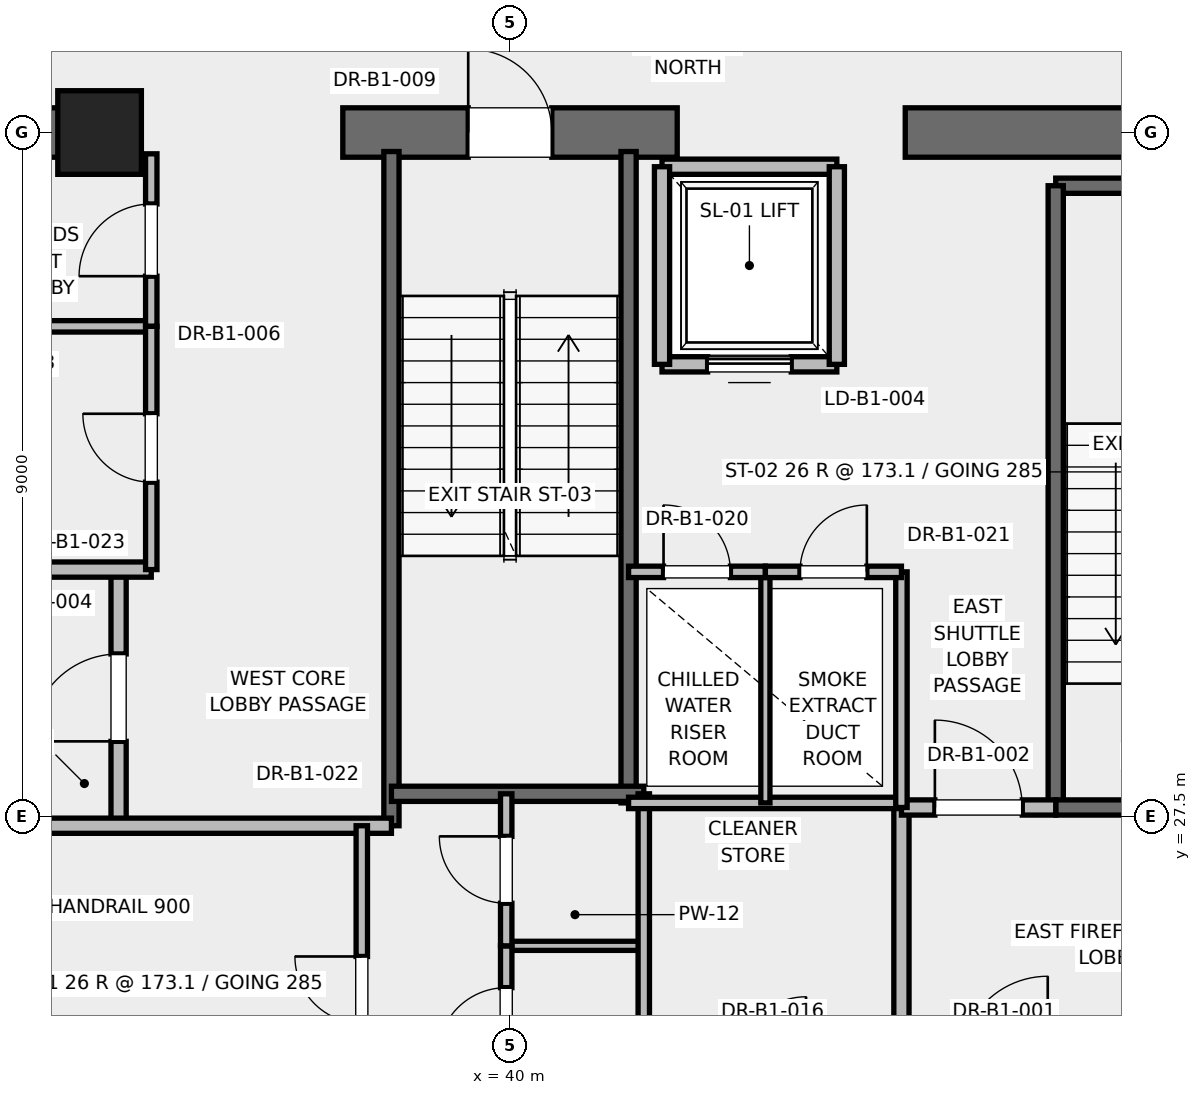
"""IFC4 building model, lengths in metres.
Left out: names, types, materials, properties, quantities, classifications, styles, units other than length and angle.
Written with IfcOpenShell. Run it as: python <this file> out.ifc"""

import sys

from ifc_helpers import new_model, si_unit, direction, frame, frame_2d, origin, origin_2d, place, context, subcontext, project, spatial, rectangle, extrude, element, fill, save


model = new_model("IFC4")
c1 = context("Model", 3, precision=1e-05, world=origin(), true_north=direction((0.0, 1.0)))
c2 = subcontext(c1, "Body", "Model", "MODEL_VIEW")
j1 = project(units=[si_unit("LENGTHUNIT", "METRE"), si_unit("PLANEANGLEUNIT", "RADIAN")], contexts=[c1])
p1 = place(None, origin())
s1 = spatial("IfcSite", under=j1, at=p1, CompositionType="ELEMENT")
p2 = place(p1, origin())
s2 = spatial("IfcBuilding", under=s1, at=p2, CompositionType="ELEMENT")
p3 = place(p2, frame((0.0, 0.0, -4.5)))
s3 = spatial("IfcBuildingStorey", under=s2, at=p3, CompositionType="ELEMENT", Elevation=-4.5)
p4 = place(p3, frame((34.6, 36.5, 0.0), z_axis=(0.0, 0.0, 1.0), x_axis=(1.0, 0.0, 0.0)))
e1 = element("IfcColumn", 1, at=p4, inside=s3, PredefinedType="PILASTER", context=c2, shape_type="SweptSolid", body=[
    extrude(rectangle(XDim=1.1, YDim=1.1, at=origin_2d()), origin(), (0.0, 0.0, 1.0), 4.5),
])
p5 = place(p3, frame((29.0, 36.5, 0.0), z_axis=(0.0, 0.0, 1.0), x_axis=(1.0, 0.0, 0.0)))
e2 = element("IfcWall", 2, at=p5, inside=s3, PredefinedType="SHEAR", context=c2, shape_type="SweptSolid", body=[
    extrude(rectangle(XDim=5.8, YDim=0.65, at=frame_2d((2.9, 0.0))), origin(), (0.0, 0.0, 1.0), 4.22),
])
p6 = place(p3, frame((37.8, 36.5, 0.0), z_axis=(0.0, 0.0, 1.0), x_axis=(1.0, 0.0, 0.0)))
e3 = element("IfcWall", 3, at=p6, inside=s3, PredefinedType="SHEAR", context=c2, shape_type="SweptSolid", body=[
    extrude(rectangle(XDim=4.4, YDim=0.65, at=frame_2d((2.2, 0.0))), origin(), (0.0, 0.0, 1.0), 4.22),
])
p7 = place(p6, frame((1.65, 0.0, 0.0)))
e4 = element("IfcOpeningElement", 4, at=p7, cuts=e3, PredefinedType="OPENING", context=c2, shape_type="SweptSolid", body=[
    extrude(rectangle(XDim=1.1, YDim=2.15, at=frame_2d((0.55, 1.075))), frame((0.0, 0.325, 0.0), z_axis=(0.0, -1.0, 0.0), x_axis=(1.0, 0.0, 0.0)), (0.0, 0.0, 1.0), 0.65),
])
p8 = place(p3, frame((45.2, 36.5, 0.0), z_axis=(0.0, 0.0, 1.0), x_axis=(1.0, 0.0, 0.0)))
e5 = element("IfcWall", 5, at=p8, inside=s3, PredefinedType="SHEAR", context=c2, shape_type="SweptSolid", body=[
    extrude(rectangle(XDim=5.8, YDim=0.65, at=frame_2d((2.9, 0.0))), origin(), (0.0, 0.0, 1.0), 4.22),
])
p9 = place(p3, frame((47.18, 35.8, 0.0), z_axis=(0.0, 0.0, 1.0), x_axis=(1.0, 0.0, 0.0)))
e6 = element("IfcWall", 6, at=p9, inside=s3, PredefinedType="SOLIDWALL", context=c2, shape_type="SweptSolid", body=[
    extrude(rectangle(XDim=3.12, YDim=0.2, at=frame_2d((1.56, 0.0))), origin(), (0.0, 0.0, 1.0), 4.22),
])
p10 = place(p3, frame((47.18, 27.62, 0.0), z_axis=(0.0, 0.0, 1.0), x_axis=(0.0, 1.0, 0.0)))
e7 = element("IfcWall", 7, at=p10, inside=s3, PredefinedType="SOLIDWALL", context=c2, shape_type="SweptSolid", body=[
    extrude(rectangle(XDim=8.18, YDim=0.2, at=frame_2d((4.09, 0.0))), origin(), (0.0, 0.0, 1.0), 4.22),
])
p11 = place(p3, frame((47.18, 27.62, 0.0), z_axis=(0.0, 0.0, 1.0), x_axis=(1.0, 0.0, 0.0)))
e8 = element("IfcWall", 8, at=p11, inside=s3, PredefinedType="SOLIDWALL", context=c2, shape_type="SweptSolid", body=[
    extrude(rectangle(XDim=3.12, YDim=0.2, at=frame_2d((1.56, 0.0))), origin(), (0.0, 0.0, 1.0), 4.22),
])
p12 = place(p11, frame((1.01, 0.0, 0.0)))
e9 = element("IfcOpeningElement", 9, at=p12, cuts=e8, PredefinedType="OPENING", context=c2, shape_type="SweptSolid", body=[
    extrude(rectangle(XDim=1.1, YDim=2.15, at=frame_2d((0.55, 1.075))), frame((0.0, 0.1, 0.0), z_axis=(0.0, -1.0, 0.0), x_axis=(1.0, 0.0, 0.0)), (0.0, 0.0, 1.0), 0.2),
])
p13 = place(p3, frame((38.44, 27.38, 0.0), z_axis=(0.0, 0.0, 1.0), x_axis=(0.0, 1.0, 0.0)))
e10 = element("IfcWall", 10, at=p13, inside=s3, PredefinedType="SOLIDWALL", context=c2, shape_type="SweptSolid", body=[
    extrude(rectangle(XDim=8.87, YDim=0.2, at=frame_2d((4.435, 0.0))), origin(), (0.0, 0.0, 1.0), 4.22),
])
p14 = place(p3, frame((41.56, 27.68, 0.0), z_axis=(0.0, 0.0, 1.0), x_axis=(0.0, 1.0, 0.0)))
e11 = element("IfcWall", 11, at=p14, inside=s3, PredefinedType="SOLIDWALL", context=c2, shape_type="SweptSolid", body=[
    extrude(rectangle(XDim=8.57, YDim=0.2, at=frame_2d((4.285, 0.0))), origin(), (0.0, 0.0, 1.0), 4.22),
])
p15 = place(p3, frame((38.44, 27.8, 0.0), z_axis=(0.0, 0.0, 1.0), x_axis=(1.0, 0.0, 0.0)))
e12 = element("IfcWall", 12, at=p15, inside=s3, PredefinedType="SOLIDWALL", context=c2, shape_type="SweptSolid", body=[
    extrude(rectangle(XDim=3.32, YDim=0.2, at=frame_2d((1.66, 0.0))), origin(), (0.0, 0.0, 1.0), 4.22),
])
p16 = place(p3, frame((34.85, 27.38, 0.0), z_axis=(0.0, 0.0, 1.0), x_axis=(0.0, 1.0, 0.0)))
e13 = element("IfcWall", 13, at=p16, inside=s3, PredefinedType="PARTITIONING", context=c2, shape_type="SweptSolid", body=[
    extrude(rectangle(XDim=3.37, YDim=0.2, at=frame_2d((1.685, 0.0))), origin(), (0.0, 0.0, 1.0), 4.22),
])
p17 = place(p16, frame((1.11, 0.0, 0.0)))
e14 = element("IfcOpeningElement", 14, at=p17, cuts=e13, PredefinedType="OPENING", context=c2, shape_type="SweptSolid", body=[
    extrude(rectangle(XDim=1.15, YDim=2.2, at=frame_2d((0.575, 1.1))), frame((0.0, 0.1, 0.0), z_axis=(0.0, -1.0, 0.0), x_axis=(1.0, 0.0, 0.0)), (0.0, 0.0, 1.0), 0.2),
])
p18 = place(p3, frame((32.82, 27.38, 0.0), z_axis=(0.0, 0.0, 1.0), x_axis=(1.0, 0.0, 0.0)))
e15 = element("IfcWall", 15, at=p18, inside=s3, PredefinedType="PARTITIONING", context=c2, shape_type="SweptSolid", body=[
    extrude(rectangle(XDim=5.62, YDim=0.2, at=frame_2d((2.81, 0.0))), origin(), (0.0, 0.0, 1.0), 4.22),
])
p19 = place(p3, frame((32.15, 30.75, 0.0), z_axis=(0.0, 0.0, 1.0), x_axis=(1.0, 0.0, 0.0)))
e16 = element("IfcWall", 16, at=p19, inside=s3, PredefinedType="PARTITIONING", context=c2, shape_type="SweptSolid", body=[
    extrude(rectangle(XDim=3.13, YDim=0.2, at=frame_2d((1.565, 0.0))), origin(), (0.0, 0.0, 1.0), 4.22),
])
p20 = place(p3, frame((45.15, 24.25, 0.0), z_axis=(0.0, 0.0, 1.0), x_axis=(0.0, 1.0, 0.0)))
e17 = element("IfcWall", 17, at=p20, inside=s3, PredefinedType="PARTITIONING", context=c2, shape_type="SweptSolid", body=[
    extrude(rectangle(XDim=3.37, YDim=0.2, at=frame_2d((1.685, 0.0))), origin(), (0.0, 0.0, 1.0), 4.22),
])
p21 = place(p3, frame((45.15, 27.62, 0.0), z_axis=(0.0, 0.0, 1.0), x_axis=(1.0, 0.0, 0.0)))
e18 = element("IfcWall", 18, at=p21, inside=s3, PredefinedType="PARTITIONING", context=c2, shape_type="SweptSolid", body=[
    extrude(rectangle(XDim=2.03, YDim=0.2, at=frame_2d((1.015, 0.0))), origin(), (0.0, 0.0, 1.0), 4.22),
])
p22 = place(p21, frame((0.44, 0.0, 0.0)))
e19 = element("IfcOpeningElement", 19, at=p22, cuts=e18, PredefinedType="OPENING", context=c2, shape_type="SweptSolid", body=[
    extrude(rectangle(XDim=1.15, YDim=2.2, at=frame_2d((0.575, 1.1))), frame((0.0, 0.1, 0.0), z_axis=(0.0, -1.0, 0.0), x_axis=(1.0, 0.0, 0.0)), (0.0, 0.0, 1.0), 0.2),
])
p23 = place(p3, frame((42.0, 33.45, 0.0), z_axis=(0.0, 0.0, 1.0), x_axis=(1.0, 0.0, 0.0)))
e20 = element("IfcWall", 20, at=p23, inside=s3, PredefinedType="SOLIDWALL", context=c2, shape_type="SweptSolid", body=[
    extrude(rectangle(XDim=2.3, YDim=0.2, at=frame_2d((1.15, 0.0))), origin(), (0.0, 0.0, 1.0), 4.22),
])
p24 = place(p23, frame((0.6, 0.0, 0.0)))
e21 = element("IfcOpeningElement", 21, at=p24, cuts=e20, PredefinedType="OPENING", context=c2, shape_type="SweptSolid", body=[
    extrude(rectangle(XDim=1.1, YDim=2.2, at=frame_2d((0.55, 1.1))), frame((0.0, 0.1, 0.0), z_axis=(0.0, -1.0, 0.0), x_axis=(1.0, 0.0, 0.0)), (0.0, 0.0, 1.0), 0.2),
])
p25 = place(p3, frame((44.3, 36.05, 0.0), z_axis=(0.0, 0.0, 1.0), x_axis=(-1.0, 0.0, 0.0)))
e22 = element("IfcWall", 22, at=p25, inside=s3, PredefinedType="SOLIDWALL", context=c2, shape_type="SweptSolid", body=[
    extrude(rectangle(XDim=2.3, YDim=0.2, at=frame_2d((1.15, 0.0))), origin(), (0.0, 0.0, 1.0), 3.0),
])
for number, where, z_axis, x_axis in (
    (23, (42.0, 36.05, 0.0), (0.0, 0.0, 1.0), (0.0, -1.0, 0.0)),
    (24, (44.3, 33.45, 0.0), (0.0, 0.0, 1.0), (0.0, 1.0, 0.0)),
):
    element("IfcWall", number, at=place(p3, frame(where, z_axis=z_axis, x_axis=x_axis)), inside=s3, PredefinedType="SOLIDWALL", context=c2, shape_type="SweptSolid", body=[
        extrude(rectangle(XDim=2.6, YDim=0.2, at=frame_2d((1.3, 0.0))), origin(), (0.0, 0.0, 1.0), 3.0),
    ])
p26 = place(p3, frame((39.95, 25.8, 0.0), z_axis=(0.0, 0.0, 1.0), x_axis=(1.0, 0.0, 0.0)))
e25 = element("IfcWall", 25, at=p26, inside=s3, PredefinedType="PARTITIONING", context=c2, shape_type="SweptSolid", body=[
    extrude(rectangle(XDim=1.81, YDim=0.12, at=frame_2d((0.905, 0.0))), origin(), (0.0, 0.0, 1.0), 2.85),
])
p27 = place(p3, frame((41.76, 23.8, 0.0), z_axis=(0.0, 0.0, 1.0), x_axis=(0.0, 1.0, 0.0)))
e26 = element("IfcWall", 26, at=p27, inside=s3, PredefinedType="PARTITIONING", context=c2, shape_type="SweptSolid", body=[
    extrude(rectangle(XDim=4.0, YDim=0.15, at=frame_2d((2.0, 0.0))), origin(), (0.0, 0.0, 1.0), 2.85),
])
p28 = place(p3, frame((39.95, 23.8, 0.0), z_axis=(0.0, 0.0, 1.0), x_axis=(0.0, 1.0, 0.0)))
e27 = element("IfcWall", 27, at=p28, inside=s3, PredefinedType="PARTITIONING", context=c2, shape_type="SweptSolid", body=[
    extrude(rectangle(XDim=2.0, YDim=0.15, at=frame_2d((1.0, 0.0))), origin(), (0.0, 0.0, 1.0), 2.85),
])
p29 = place(p28, frame((0.55, 0.0, 0.0)))
e28 = element("IfcOpeningElement", 28, at=p29, cuts=e27, PredefinedType="OPENING", context=c2, shape_type="SweptSolid", body=[
    extrude(rectangle(XDim=0.9, YDim=2.1, at=frame_2d((0.45, 1.05))), frame((0.0, 0.075, 0.0), z_axis=(0.0, -1.0, 0.0), x_axis=(1.0, 0.0, 0.0)), (0.0, 0.0, 1.0), 0.15),
])
p30 = place(p3, frame((39.95, 25.8, 0.0), z_axis=(0.0, 0.0, 1.0), x_axis=(0.0, 1.0, 0.0)))
e29 = element("IfcWall", 29, at=p30, inside=s3, PredefinedType="PARTITIONING", context=c2, shape_type="SweptSolid", body=[
    extrude(rectangle(XDim=2.0, YDim=0.15, at=frame_2d((1.0, 0.0))), origin(), (0.0, 0.0, 1.0), 2.85),
])
p31 = place(p30, frame((0.56, 0.0, 0.0)))
e30 = element("IfcOpeningElement", 30, at=p31, cuts=e29, PredefinedType="OPENING", context=c2, shape_type="SweptSolid", body=[
    extrude(rectangle(XDim=0.88, YDim=2.1, at=frame_2d((0.44, 1.05))), frame((0.0, 0.075, 0.0), z_axis=(0.0, -1.0, 0.0), x_axis=(1.0, 0.0, 0.0)), (0.0, 0.0, 1.0), 0.15),
])
p32 = place(p3, frame((32.15, 33.95, 0.0), z_axis=(0.0, 0.0, 1.0), x_axis=(1.0, 0.0, 0.0)))
e31 = element("IfcWall", 31, at=p32, inside=s3, PredefinedType="PARTITIONING", context=c2, shape_type="SweptSolid", body=[
    extrude(rectangle(XDim=3.13, YDim=0.15, at=frame_2d((1.565, 0.0))), origin(), (0.0, 0.0, 1.0), 2.85),
])
p33 = place(p3, frame((35.28, 33.95, 0.0), z_axis=(0.0, 0.0, 1.0), x_axis=(0.0, 1.0, 0.0)))
e32 = element("IfcWall", 32, at=p33, inside=s3, PredefinedType="PARTITIONING", context=c2, shape_type="SweptSolid", body=[
    extrude(rectangle(XDim=2.27, YDim=0.15, at=frame_2d((1.135, 0.0))), origin(), (0.0, 0.0, 1.0), 2.85),
])
p34 = place(p33, frame((0.66, 0.0, 0.0)))
e33 = element("IfcOpeningElement", 33, at=p34, cuts=e32, PredefinedType="OPENING", context=c2, shape_type="SweptSolid", body=[
    extrude(rectangle(XDim=0.95, YDim=2.15, at=frame_2d((0.475, 1.075))), frame((0.0, 0.075, 0.0), z_axis=(0.0, -1.0, 0.0), x_axis=(1.0, 0.0, 0.0)), (0.0, 0.0, 1.0), 0.15),
])
p35 = place(p3, frame((35.28, 30.75, 0.0), z_axis=(0.0, 0.0, 1.0), x_axis=(0.0, 1.0, 0.0)))
e34 = element("IfcWall", 34, at=p35, inside=s3, PredefinedType="PARTITIONING", context=c2, shape_type="SweptSolid", body=[
    extrude(rectangle(XDim=3.2, YDim=0.15, at=frame_2d((1.6, 0.0))), origin(), (0.0, 0.0, 1.0), 2.85),
])
p36 = place(p35, frame((1.15, 0.0, 0.0)))
e35 = element("IfcOpeningElement", 35, at=p36, cuts=e34, PredefinedType="OPENING", context=c2, shape_type="SweptSolid", body=[
    extrude(rectangle(XDim=0.9, YDim=2.1, at=frame_2d((0.45, 1.05))), frame((0.0, 0.075, 0.0), z_axis=(0.0, -1.0, 0.0), x_axis=(1.0, 0.0, 0.0)), (0.0, 0.0, 1.0), 0.15),
])
p37 = place(p3, frame((38.05, 23.06, 0.0), z_axis=(0.0, 0.0, 1.0), x_axis=(0.0, 1.0, 0.0)))
e36 = element("IfcWall", 36, at=p37, inside=s3, PredefinedType="PARTITIONING", context=c2, shape_type="SweptSolid", body=[
    extrude(rectangle(XDim=4.32, YDim=0.15, at=frame_2d((2.16, 0.0))), origin(), (0.0, 0.0, 1.0), 2.85),
])
p38 = place(p37, frame((1.72, 0.0, 0.0)))
e37 = element("IfcOpeningElement", 37, at=p38, cuts=e36, PredefinedType="OPENING", context=c2, shape_type="SweptSolid", body=[
    extrude(rectangle(XDim=0.88, YDim=2.1, at=frame_2d((0.44, 1.05))), frame((0.0, 0.075, 0.0), z_axis=(0.0, -1.0, 0.0), x_axis=(1.0, 0.0, 0.0)), (0.0, 0.0, 1.0), 0.15),
])
p39 = place(p3, frame((41.56, 27.68, 0.0), z_axis=(0.0, 0.0, 1.0), x_axis=(1.0, 0.0, 0.0)))
e38 = element("IfcWall", 38, at=p39, inside=s3, PredefinedType="PARTITIONING", context=c2, shape_type="SweptSolid", body=[
    extrude(rectangle(XDim=3.59, YDim=0.15, at=frame_2d((1.795, 0.0))), origin(), (0.0, 0.0, 1.0), 2.85),
])
p40 = place(p3, frame((45.15, 27.62, 0.0), z_axis=(0.0, 0.0, 1.0), x_axis=(0.0, 1.0, 0.0)))
e39 = element("IfcWall", 39, at=p40, inside=s3, PredefinedType="PARTITIONING", context=c2, shape_type="SweptSolid", body=[
    extrude(rectangle(XDim=3.1, YDim=0.15, at=frame_2d((1.55, 0.0))), origin(), (0.0, 0.0, 1.0), 2.85),
])
p41 = place(p3, frame((43.36, 27.68, 0.0), z_axis=(0.0, 0.0, 1.0), x_axis=(0.0, 1.0, 0.0)))
e40 = element("IfcWall", 40, at=p41, inside=s3, PredefinedType="PARTITIONING", context=c2, shape_type="SweptSolid", body=[
    extrude(rectangle(XDim=3.04, YDim=0.12, at=frame_2d((1.52, 0.0))), origin(), (0.0, 0.0, 1.0), 2.85),
])
p42 = place(p3, frame((41.56, 30.72, 0.0), z_axis=(0.0, 0.0, 1.0), x_axis=(1.0, 0.0, 0.0)))
e41 = element("IfcWall", 41, at=p42, inside=s3, PredefinedType="PARTITIONING", context=c2, shape_type="SweptSolid", body=[
    extrude(rectangle(XDim=1.8, YDim=0.15, at=frame_2d((0.9, 0.0))), origin(), (0.0, 0.0, 1.0), 2.85),
])
p43 = place(p42, frame((0.46, 0.0, 0.0)))
e42 = element("IfcOpeningElement", 42, at=p43, cuts=e41, PredefinedType="OPENING", context=c2, shape_type="SweptSolid", body=[
    extrude(rectangle(XDim=0.88, YDim=2.1, at=frame_2d((0.44, 1.05))), frame((0.0, 0.075, 0.0), z_axis=(0.0, -1.0, 0.0), x_axis=(1.0, 0.0, 0.0)), (0.0, 0.0, 1.0), 0.15),
])
p44 = place(p3, frame((43.36, 30.72, 0.0), z_axis=(0.0, 0.0, 1.0), x_axis=(1.0, 0.0, 0.0)))
e43 = element("IfcWall", 43, at=p44, inside=s3, PredefinedType="PARTITIONING", context=c2, shape_type="SweptSolid", body=[
    extrude(rectangle(XDim=1.79, YDim=0.15, at=frame_2d((0.895, 0.0))), origin(), (0.0, 0.0, 1.0), 2.85),
])
p45 = place(p44, frame((0.455, 0.0, 0.0)))
e44 = element("IfcOpeningElement", 44, at=p45, cuts=e43, PredefinedType="OPENING", context=c2, shape_type="SweptSolid", body=[
    extrude(rectangle(XDim=0.88, YDim=2.1, at=frame_2d((0.44, 1.05))), frame((0.0, 0.075, 0.0), z_axis=(0.0, -1.0, 0.0), x_axis=(1.0, 0.0, 0.0)), (0.0, 0.0, 1.0), 0.15),
])
p46 = place(p7, origin())
e45 = element("IfcDoor", 45, at=p46, inside=s3, OperationType="SINGLE_SWING_LEFT", PredefinedType="DOOR", context=c2, shape_type="SweptSolid", body=[
    extrude(rectangle(XDim=1.1, YDim=2.15, at=frame_2d((0.55, 1.075))), frame((0.0, 0.025, 0.0), z_axis=(0.0, -1.0, 0.0), x_axis=(1.0, 0.0, 0.0)), (0.0, 0.0, 1.0), 0.05),
])
fill(e4, e45)
p47 = place(p17, origin())
e46 = element("IfcDoor", 46, at=p47, inside=s3, OperationType="SINGLE_SWING_LEFT", PredefinedType="DOOR", context=c2, shape_type="SweptSolid", body=[
    extrude(rectangle(XDim=1.15, YDim=2.2, at=frame_2d((0.575, 1.1))), frame((0.0, 0.025, 0.0), z_axis=(0.0, -1.0, 0.0), x_axis=(1.0, 0.0, 0.0)), (0.0, 0.0, 1.0), 0.05),
])
fill(e14, e46)
p48 = place(p22, origin())
e47 = element("IfcDoor", 47, at=p48, inside=s3, OperationType="SINGLE_SWING_LEFT", PredefinedType="DOOR", context=c2, shape_type="SweptSolid", body=[
    extrude(rectangle(XDim=1.15, YDim=2.2, at=frame_2d((0.575, 1.1))), frame((0.0, 0.025, 0.0), z_axis=(0.0, -1.0, 0.0), x_axis=(1.0, 0.0, 0.0)), (0.0, 0.0, 1.0), 0.05),
])
fill(e19, e47)
p49 = place(p24, origin())
e48 = element("IfcDoor", 48, at=p49, inside=s3, OperationType="SLIDING_TO_RIGHT", PredefinedType="DOOR", context=c2, shape_type="SweptSolid", body=[
    extrude(rectangle(XDim=1.1, YDim=2.2, at=frame_2d((0.55, 1.1))), frame((0.0, 0.025, 0.0), z_axis=(0.0, -1.0, 0.0), x_axis=(1.0, 0.0, 0.0)), (0.0, 0.0, 1.0), 0.05),
])
fill(e21, e48)
p50 = place(p29, origin())
e49 = element("IfcDoor", 49, at=p50, inside=s3, OperationType="SINGLE_SWING_LEFT", PredefinedType="DOOR", context=c2, shape_type="SweptSolid", body=[
    extrude(rectangle(XDim=0.9, YDim=2.1, at=frame_2d((0.45, 1.05))), frame((0.0, 0.025, 0.0), z_axis=(0.0, -1.0, 0.0), x_axis=(1.0, 0.0, 0.0)), (0.0, 0.0, 1.0), 0.05),
])
fill(e28, e49)
p51 = place(p31, origin())
e50 = element("IfcDoor", 50, at=p51, inside=s3, OperationType="SINGLE_SWING_RIGHT", PredefinedType="DOOR", context=c2, shape_type="SweptSolid", body=[
    extrude(rectangle(XDim=0.88, YDim=2.1, at=frame_2d((0.44, 1.05))), frame((0.0, 0.025, 0.0), z_axis=(0.0, -1.0, 0.0), x_axis=(1.0, 0.0, 0.0)), (0.0, 0.0, 1.0), 0.05),
])
fill(e30, e50)
p52 = place(p34, origin())
e51 = element("IfcDoor", 51, at=p52, inside=s3, OperationType="SINGLE_SWING_LEFT", PredefinedType="DOOR", context=c2, shape_type="SweptSolid", body=[
    extrude(rectangle(XDim=0.95, YDim=2.15, at=frame_2d((0.475, 1.075))), frame((0.0, 0.025, 0.0), z_axis=(0.0, -1.0, 0.0), x_axis=(1.0, 0.0, 0.0)), (0.0, 0.0, 1.0), 0.05),
])
fill(e33, e51)
p53 = place(p36, origin())
e52 = element("IfcDoor", 52, at=p53, inside=s3, OperationType="SINGLE_SWING_RIGHT", PredefinedType="DOOR", context=c2, shape_type="SweptSolid", body=[
    extrude(rectangle(XDim=0.9, YDim=2.1, at=frame_2d((0.45, 1.05))), frame((0.0, 0.025, 0.0), z_axis=(0.0, -1.0, 0.0), x_axis=(1.0, 0.0, 0.0)), (0.0, 0.0, 1.0), 0.05),
])
fill(e35, e52)
p54 = place(p38, origin())
e53 = element("IfcDoor", 53, at=p54, inside=s3, OperationType="SINGLE_SWING_RIGHT", PredefinedType="DOOR", context=c2, shape_type="SweptSolid", body=[
    extrude(rectangle(XDim=0.88, YDim=2.1, at=frame_2d((0.44, 1.05))), frame((0.0, 0.025, 0.0), z_axis=(0.0, -1.0, 0.0), x_axis=(1.0, 0.0, 0.0)), (0.0, 0.0, 1.0), 0.05),
])
fill(e37, e53)
p55 = place(p43, origin())
e54 = element("IfcDoor", 54, at=p55, inside=s3, OperationType="SINGLE_SWING_LEFT", PredefinedType="DOOR", context=c2, shape_type="SweptSolid", body=[
    extrude(rectangle(XDim=0.88, YDim=2.1, at=frame_2d((0.44, 1.05))), frame((0.0, 0.025, 0.0), z_axis=(0.0, -1.0, 0.0), x_axis=(1.0, 0.0, 0.0)), (0.0, 0.0, 1.0), 0.05),
])
fill(e42, e54)
p56 = place(p45, origin())
e55 = element("IfcDoor", 55, at=p56, inside=s3, OperationType="SINGLE_SWING_RIGHT", PredefinedType="DOOR", context=c2, shape_type="SweptSolid", body=[
    extrude(rectangle(XDim=0.88, YDim=2.1, at=frame_2d((0.44, 1.05))), frame((0.0, 0.025, 0.0), z_axis=(0.0, -1.0, 0.0), x_axis=(1.0, 0.0, 0.0)), (0.0, 0.0, 1.0), 0.05),
])
fill(e44, e55)
save(model, sys.argv[1])
